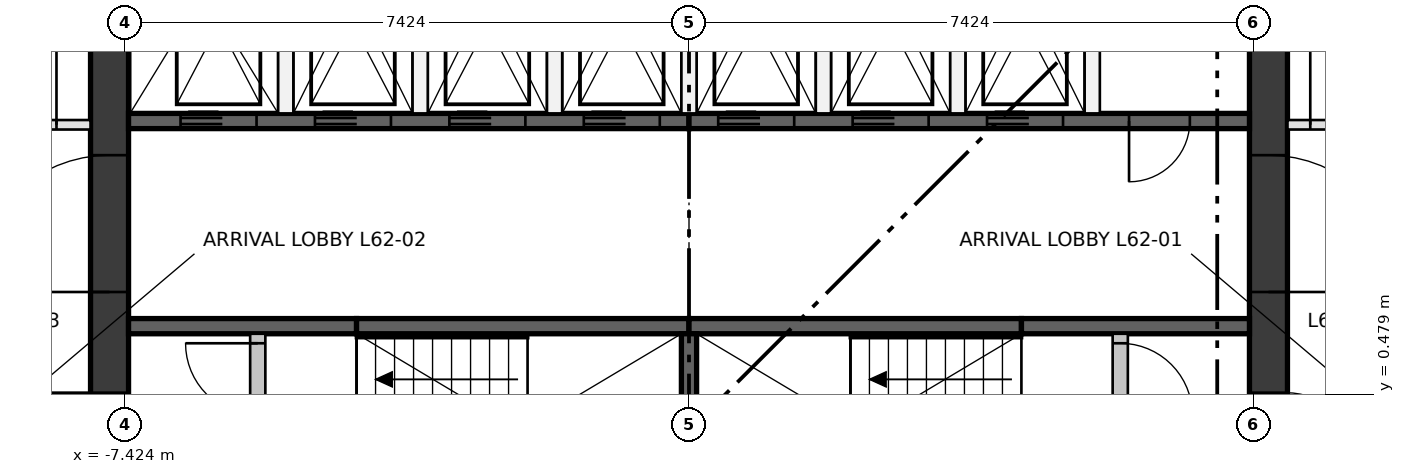
"""IFC4 building model, lengths in metres.
Left out: names, types, materials, properties, quantities, classifications, styles, units other than length and angle.
Written with IfcOpenShell. Run it as: python <this file> out.ifc"""

import sys

from ifc_helpers import new_model, si_unit, direction, frame, frame_2d, origin, place, context, subcontext, project, spatial, rectangle, extrude, element, fill, save


model = new_model("IFC4")
c1 = context("Model", 3, precision=1e-05, world=origin(), true_north=direction((0.0, 1.0)))
c2 = subcontext(c1, "Body", "Model", "MODEL_VIEW")
j1 = project(units=[si_unit("LENGTHUNIT", "METRE"), si_unit("PLANEANGLEUNIT", "RADIAN")], contexts=[c1])
p1 = place(None, origin())
s1 = spatial("IfcSite", under=j1, at=p1, CompositionType="ELEMENT")
p2 = place(p1, origin())
s2 = spatial("IfcBuilding", under=s1, at=p2, CompositionType="ELEMENT")
p3 = place(p2, frame((0.0, 0.0, 227.85)))
s3 = spatial("IfcBuildingStorey", under=s2, at=p3, CompositionType="ELEMENT", Elevation=227.85)
p4 = place(p3, frame((-7.624, -7.374, 0.0), z_axis=(0.0, 0.0, 1.0), x_axis=(0.0, 1.0, 0.0)))
e1 = element("IfcWall", 1, at=p4, inside=s3, PredefinedType="SHEAR", context=c2, shape_type="SweptSolid", body=[
    extrude(rectangle(XDim=14.748, YDim=0.5, at=frame_2d((7.374, 0.0))), origin(), (0.0, 0.0, 1.0), 3.35),
])
p5 = place(p4, frame((6.874, 0.0, 0.0)))
e2 = element("IfcOpeningElement", 2, at=p5, cuts=e1, PredefinedType="OPENING", context=c2, shape_type="SweptSolid", body=[
    extrude(rectangle(XDim=1.0, YDim=2.1, at=frame_2d((0.5, 1.05))), frame((0.0, 0.26, 0.0), z_axis=(0.0, -1.0, 0.0), x_axis=(1.0, 0.0, 0.0)), (0.0, 0.0, 1.0), 0.52),
])
p6 = place(p4, frame((3.75, 0.0, 0.0)))
e3 = element("IfcOpeningElement", 3, at=p6, cuts=e1, PredefinedType="OPENING", context=c2, shape_type="SweptSolid", body=[
    extrude(rectangle(XDim=1.8, YDim=2.1, at=frame_2d((0.9, 1.05))), frame((0.0, 0.26, 0.0), z_axis=(0.0, -1.0, 0.0), x_axis=(1.0, 0.0, 0.0)), (0.0, 0.0, 1.0), 0.52),
])
p7 = place(p4, frame((9.198, 0.0, 0.0)))
e4 = element("IfcOpeningElement", 4, at=p7, cuts=e1, PredefinedType="OPENING", context=c2, shape_type="SweptSolid", body=[
    extrude(rectangle(XDim=1.8, YDim=2.1, at=frame_2d((0.9, 1.05))), frame((0.0, 0.26, 0.0), z_axis=(0.0, -1.0, 0.0), x_axis=(1.0, 0.0, 0.0)), (0.0, 0.0, 1.0), 0.52),
])
p8 = place(p3, frame((7.624, -7.374, 0.0), z_axis=(0.0, 0.0, 1.0), x_axis=(0.0, 1.0, 0.0)))
e5 = element("IfcWall", 5, at=p8, inside=s3, PredefinedType="SHEAR", context=c2, shape_type="SweptSolid", body=[
    extrude(rectangle(XDim=14.748, YDim=0.5, at=frame_2d((7.374, 0.0))), origin(), (0.0, 0.0, 1.0), 3.35),
])
p9 = place(p8, frame((6.874, 0.0, 0.0)))
e6 = element("IfcOpeningElement", 6, at=p9, cuts=e5, PredefinedType="OPENING", context=c2, shape_type="SweptSolid", body=[
    extrude(rectangle(XDim=1.0, YDim=2.1, at=frame_2d((0.5, 1.05))), frame((0.0, 0.26, 0.0), z_axis=(0.0, -1.0, 0.0), x_axis=(1.0, 0.0, 0.0)), (0.0, 0.0, 1.0), 0.52),
])
p10 = place(p8, frame((3.75, 0.0, 0.0)))
e7 = element("IfcOpeningElement", 7, at=p10, cuts=e5, PredefinedType="OPENING", context=c2, shape_type="SweptSolid", body=[
    extrude(rectangle(XDim=1.8, YDim=2.1, at=frame_2d((0.9, 1.05))), frame((0.0, 0.26, 0.0), z_axis=(0.0, -1.0, 0.0), x_axis=(1.0, 0.0, 0.0)), (0.0, 0.0, 1.0), 0.52),
])
p11 = place(p8, frame((9.198, 0.0, 0.0)))
e8 = element("IfcOpeningElement", 8, at=p11, cuts=e5, PredefinedType="OPENING", context=c2, shape_type="SweptSolid", body=[
    extrude(rectangle(XDim=1.8, YDim=2.1, at=frame_2d((0.9, 1.05))), frame((0.0, 0.26, 0.0), z_axis=(0.0, -1.0, 0.0), x_axis=(1.0, 0.0, 0.0)), (0.0, 0.0, 1.0), 0.52),
])
p12 = place(p3, frame((-7.374, 4.074, 0.0), z_axis=(0.0, 0.0, 1.0), x_axis=(1.0, 0.0, 0.0)))
e9 = element("IfcWall", 9, at=p12, inside=s3, PredefinedType="SHEAR", context=c2, shape_type="SweptSolid", body=[
    extrude(rectangle(XDim=7.374, YDim=0.2, at=frame_2d((3.687, 0.0))), origin(), (0.0, 0.0, 1.0), 3.0),
])
p13 = place(p12, frame((0.684, 0.0, 0.0)))
e10 = element("IfcOpeningElement", 10, at=p13, cuts=e9, PredefinedType="OPENING", context=c2, shape_type="SweptSolid", body=[
    extrude(rectangle(XDim=1.0, YDim=2.1, at=frame_2d((0.5, 1.05))), frame((0.0, 0.11, 0.0), z_axis=(0.0, -1.0, 0.0), x_axis=(1.0, 0.0, 0.0)), (0.0, 0.0, 1.0), 0.22),
])
p14 = place(p12, frame((2.453, 0.0, 0.0)))
e11 = element("IfcOpeningElement", 11, at=p14, cuts=e9, PredefinedType="OPENING", context=c2, shape_type="SweptSolid", body=[
    extrude(rectangle(XDim=1.0, YDim=2.1, at=frame_2d((0.5, 1.05))), frame((0.0, 0.11, 0.0), z_axis=(0.0, -1.0, 0.0), x_axis=(1.0, 0.0, 0.0)), (0.0, 0.0, 1.0), 0.22),
])
p15 = place(p12, frame((4.221, 0.0, 0.0)))
e12 = element("IfcOpeningElement", 12, at=p15, cuts=e9, PredefinedType="OPENING", context=c2, shape_type="SweptSolid", body=[
    extrude(rectangle(XDim=1.0, YDim=2.1, at=frame_2d((0.5, 1.05))), frame((0.0, 0.11, 0.0), z_axis=(0.0, -1.0, 0.0), x_axis=(1.0, 0.0, 0.0)), (0.0, 0.0, 1.0), 0.22),
])
p16 = place(p12, frame((5.99, 0.0, 0.0)))
e13 = element("IfcOpeningElement", 13, at=p16, cuts=e9, PredefinedType="OPENING", context=c2, shape_type="SweptSolid", body=[
    extrude(rectangle(XDim=1.0, YDim=2.1, at=frame_2d((0.5, 1.05))), frame((0.0, 0.11, 0.0), z_axis=(0.0, -1.0, 0.0), x_axis=(1.0, 0.0, 0.0)), (0.0, 0.0, 1.0), 0.22),
])
p17 = place(p3, frame((0.0, 4.074, 0.0), z_axis=(0.0, 0.0, 1.0), x_axis=(1.0, 0.0, 0.0)))
e14 = element("IfcWall", 14, at=p17, inside=s3, PredefinedType="SHEAR", context=c2, shape_type="SweptSolid", body=[
    extrude(rectangle(XDim=7.374, YDim=0.2, at=frame_2d((3.687, 0.0))), origin(), (0.0, 0.0, 1.0), 3.0),
])
p18 = place(p17, frame((0.384, 0.0, 0.0)))
e15 = element("IfcOpeningElement", 15, at=p18, cuts=e14, PredefinedType="OPENING", context=c2, shape_type="SweptSolid", body=[
    extrude(rectangle(XDim=1.0, YDim=2.1, at=frame_2d((0.5, 1.05))), frame((0.0, 0.11, 0.0), z_axis=(0.0, -1.0, 0.0), x_axis=(1.0, 0.0, 0.0)), (0.0, 0.0, 1.0), 0.22),
])
p19 = place(p17, frame((2.153, 0.0, 0.0)))
e16 = element("IfcOpeningElement", 16, at=p19, cuts=e14, PredefinedType="OPENING", context=c2, shape_type="SweptSolid", body=[
    extrude(rectangle(XDim=1.0, YDim=2.1, at=frame_2d((0.5, 1.05))), frame((0.0, 0.11, 0.0), z_axis=(0.0, -1.0, 0.0), x_axis=(1.0, 0.0, 0.0)), (0.0, 0.0, 1.0), 0.22),
])
p20 = place(p17, frame((3.921, 0.0, 0.0)))
e17 = element("IfcOpeningElement", 17, at=p20, cuts=e14, PredefinedType="OPENING", context=c2, shape_type="SweptSolid", body=[
    extrude(rectangle(XDim=1.0, YDim=2.1, at=frame_2d((0.5, 1.05))), frame((0.0, 0.11, 0.0), z_axis=(0.0, -1.0, 0.0), x_axis=(1.0, 0.0, 0.0)), (0.0, 0.0, 1.0), 0.22),
])
p21 = place(p17, frame((5.79, 0.0, 0.0)))
e18 = element("IfcOpeningElement", 18, at=p21, cuts=e14, PredefinedType="OPENING", context=c2, shape_type="SweptSolid", body=[
    extrude(rectangle(XDim=0.8, YDim=2.1, at=frame_2d((0.4, 1.05))), frame((0.0, 0.11, 0.0), z_axis=(0.0, -1.0, 0.0), x_axis=(1.0, 0.0, 0.0)), (0.0, 0.0, 1.0), 0.22),
])
p22 = place(p3, frame((-7.374, 1.375, 0.0), z_axis=(0.0, 0.0, 1.0), x_axis=(1.0, 0.0, 0.0)))
e19 = element("IfcWall", 19, at=p22, inside=s3, PredefinedType="SHEAR", context=c2, shape_type="SweptSolid", body=[
    extrude(rectangle(XDim=3.0, YDim=0.2, at=frame_2d((1.5, 0.0))), origin(), (0.0, 0.0, 1.0), 3.0),
])
for number, where, z_axis, x_axis in (
    (20, (-4.374, 1.375, 0.0), (0.0, 0.0, 1.0), (1.0, 0.0, 0.0)),
    (21, (0.0, 1.375, 0.0), (0.0, 0.0, 1.0), (1.0, 0.0, 0.0)),
):
    element("IfcWall", number, at=place(p3, frame(where, z_axis=z_axis, x_axis=x_axis)), inside=s3, PredefinedType="SHEAR", context=c2, shape_type="SweptSolid", body=[
        extrude(rectangle(XDim=4.374, YDim=0.2, at=frame_2d((2.187, 0.0))), origin(), (0.0, 0.0, 1.0), 3.0),
    ])
p23 = place(p3, frame((4.374, 1.375, 0.0), z_axis=(0.0, 0.0, 1.0), x_axis=(1.0, 0.0, 0.0)))
e22 = element("IfcWall", 22, at=p23, inside=s3, PredefinedType="SHEAR", context=c2, shape_type="SweptSolid", body=[
    extrude(rectangle(XDim=3.0, YDim=0.2, at=frame_2d((1.5, 0.0))), origin(), (0.0, 0.0, 1.0), 3.0),
])
p24 = place(p3, frame((0.0, -1.275, 0.0), z_axis=(0.0, 0.0, 1.0), x_axis=(0.0, 1.0, 0.0)))
e23 = element("IfcWall", 23, at=p24, inside=s3, PredefinedType="SHEAR", context=c2, shape_type="SweptSolid", body=[
    extrude(rectangle(XDim=2.55, YDim=0.2, at=frame_2d((1.275, 0.0))), origin(), (0.0, 0.0, 1.0), 3.0),
])
for number, where, z_axis, x_axis in (
    (24, (-5.305, 4.174, 0.0), (0.0, 0.0, 1.0), (0.0, 1.0, 0.0)),
    (25, (-3.537, 4.174, 0.0), (0.0, 0.0, 1.0), (0.0, 1.0, 0.0)),
    (26, (-1.769, 4.174, 0.0), (0.0, 0.0, 1.0), (0.0, 1.0, 0.0)),
    (27, (0.0, 4.174, 0.0), (0.0, 0.0, 1.0), (0.0, 1.0, 0.0)),
    (28, (1.769, 4.174, 0.0), (0.0, 0.0, 1.0), (0.0, 1.0, 0.0)),
    (29, (3.537, 4.174, 0.0), (0.0, 0.0, 1.0), (0.0, 1.0, 0.0)),
    (30, (5.305, 4.174, 0.0), (0.0, 0.0, 1.0), (0.0, 1.0, 0.0)),
):
    element("IfcWall", number, at=place(p3, frame(where, z_axis=z_axis, x_axis=x_axis)), inside=s3, PredefinedType="PARTITIONING", context=c2, shape_type="SweptSolid", body=[
        extrude(rectangle(XDim=3.2, YDim=0.2, at=frame_2d((1.6, 0.0))), origin(), (0.0, 0.0, 1.0), 3.0),
    ])
p25 = place(p3, frame((-5.674, -1.275, 0.0), z_axis=(0.0, 0.0, 1.0), x_axis=(0.0, 1.0, 0.0)))
e31 = element("IfcWall", 31, at=p25, inside=s3, PredefinedType="PARTITIONING", context=c2, shape_type="SweptSolid", body=[
    extrude(rectangle(XDim=2.55, YDim=0.2, at=frame_2d((1.275, 0.0))), origin(), (0.0, 0.0, 1.0), 3.0),
])
p26 = place(p25, frame((0.125, 0.0, 0.0)))
e32 = element("IfcOpeningElement", 32, at=p26, cuts=e31, PredefinedType="OPENING", context=c2, shape_type="SweptSolid", body=[
    extrude(rectangle(XDim=0.95, YDim=2.1, at=frame_2d((0.475, 1.05))), frame((0.0, 0.11, 0.0), z_axis=(0.0, -1.0, 0.0), x_axis=(1.0, 0.0, 0.0)), (0.0, 0.0, 1.0), 0.22),
])
p27 = place(p25, frame((1.475, 0.0, 0.0)))
e33 = element("IfcOpeningElement", 33, at=p27, cuts=e31, PredefinedType="OPENING", context=c2, shape_type="SweptSolid", body=[
    extrude(rectangle(XDim=0.95, YDim=2.1, at=frame_2d((0.475, 1.05))), frame((0.0, 0.11, 0.0), z_axis=(0.0, -1.0, 0.0), x_axis=(1.0, 0.0, 0.0)), (0.0, 0.0, 1.0), 0.22),
])
p28 = place(p3, frame((5.674, -1.275, 0.0), z_axis=(0.0, 0.0, 1.0), x_axis=(0.0, 1.0, 0.0)))
e34 = element("IfcWall", 34, at=p28, inside=s3, PredefinedType="PARTITIONING", context=c2, shape_type="SweptSolid", body=[
    extrude(rectangle(XDim=2.55, YDim=0.2, at=frame_2d((1.275, 0.0))), origin(), (0.0, 0.0, 1.0), 3.0),
])
p29 = place(p28, frame((0.125, 0.0, 0.0)))
e35 = element("IfcOpeningElement", 35, at=p29, cuts=e34, PredefinedType="OPENING", context=c2, shape_type="SweptSolid", body=[
    extrude(rectangle(XDim=0.95, YDim=2.1, at=frame_2d((0.475, 1.05))), frame((0.0, 0.11, 0.0), z_axis=(0.0, -1.0, 0.0), x_axis=(1.0, 0.0, 0.0)), (0.0, 0.0, 1.0), 0.22),
])
p30 = place(p28, frame((1.475, 0.0, 0.0)))
e36 = element("IfcOpeningElement", 36, at=p30, cuts=e34, PredefinedType="OPENING", context=c2, shape_type="SweptSolid", body=[
    extrude(rectangle(XDim=0.95, YDim=2.1, at=frame_2d((0.475, 1.05))), frame((0.0, 0.11, 0.0), z_axis=(0.0, -1.0, 0.0), x_axis=(1.0, 0.0, 0.0)), (0.0, 0.0, 1.0), 0.22),
])
p31 = place(p3, frame((7.874, 4.024, 0.0), z_axis=(0.0, 0.0, 1.0), x_axis=(1.0, 0.0, 0.0)))
e37 = element("IfcWall", 37, at=p31, inside=s3, PredefinedType="PARTITIONING", context=c2, shape_type="SweptSolid", body=[
    extrude(rectangle(XDim=2.159, YDim=0.125, at=frame_2d((1.08, 0.0))), origin(), (0.0, 0.0, 1.0), 3.0),
])
p32 = place(p31, frame((0.3, 0.0, 0.0)))
e38 = element("IfcOpeningElement", 38, at=p32, cuts=e37, PredefinedType="OPENING", context=c2, shape_type="SweptSolid", body=[
    extrude(rectangle(XDim=1.0, YDim=2.1, at=frame_2d((0.5, 1.05))), frame((0.0, 0.073, 0.0), z_axis=(0.0, -1.0, 0.0), x_axis=(1.0, 0.0, 0.0)), (0.0, 0.0, 1.0), 0.145),
])
p33 = place(p3, frame((-9.822, 4.024, 0.0), z_axis=(0.0, 0.0, 1.0), x_axis=(1.0, 0.0, 0.0)))
e39 = element("IfcWall", 39, at=p33, inside=s3, PredefinedType="PARTITIONING", context=c2, shape_type="SweptSolid", body=[
    extrude(rectangle(XDim=1.948, YDim=0.125, at=frame_2d((0.974, 0.0))), origin(), (0.0, 0.0, 1.0), 3.0),
])
p34 = place(p33, frame((0.5, 0.0, 0.0)))
e40 = element("IfcOpeningElement", 40, at=p34, cuts=e39, PredefinedType="OPENING", context=c2, shape_type="SweptSolid", body=[
    extrude(rectangle(XDim=1.0, YDim=2.1, at=frame_2d((0.5, 1.05))), frame((0.0, 0.073, 0.0), z_axis=(0.0, -1.0, 0.0), x_axis=(1.0, 0.0, 0.0)), (0.0, 0.0, 1.0), 0.145),
])
p35 = place(p13, frame((1.0, 0.0, 0.0), z_axis=(0.0, 0.0, 1.0), x_axis=(-1.0, 0.0, 0.0)))
e41 = element("IfcDoor", 41, at=p35, inside=s3, OperationType="DOUBLE_DOOR_SLIDING", PredefinedType="DOOR", context=c2, shape_type="SweptSolid", body=[
    extrude(rectangle(XDim=1.0, YDim=2.1, at=frame_2d((0.5, 1.05))), frame((0.0, 0.025, 0.0), z_axis=(0.0, -1.0, 0.0), x_axis=(1.0, 0.0, 0.0)), (0.0, 0.0, 1.0), 0.05),
])
fill(e10, e41)
p36 = place(p14, frame((1.0, 0.0, 0.0), z_axis=(0.0, 0.0, 1.0), x_axis=(-1.0, 0.0, 0.0)))
e42 = element("IfcDoor", 42, at=p36, inside=s3, OperationType="DOUBLE_DOOR_SLIDING", PredefinedType="DOOR", context=c2, shape_type="SweptSolid", body=[
    extrude(rectangle(XDim=1.0, YDim=2.1, at=frame_2d((0.5, 1.05))), frame((0.0, 0.025, 0.0), z_axis=(0.0, -1.0, 0.0), x_axis=(1.0, 0.0, 0.0)), (0.0, 0.0, 1.0), 0.05),
])
fill(e11, e42)
p37 = place(p15, frame((1.0, 0.0, 0.0), z_axis=(0.0, 0.0, 1.0), x_axis=(-1.0, 0.0, 0.0)))
e43 = element("IfcDoor", 43, at=p37, inside=s3, OperationType="DOUBLE_DOOR_SLIDING", PredefinedType="DOOR", context=c2, shape_type="SweptSolid", body=[
    extrude(rectangle(XDim=1.0, YDim=2.1, at=frame_2d((0.5, 1.05))), frame((0.0, 0.025, 0.0), z_axis=(0.0, -1.0, 0.0), x_axis=(1.0, 0.0, 0.0)), (0.0, 0.0, 1.0), 0.05),
])
fill(e12, e43)
p38 = place(p16, frame((1.0, 0.0, 0.0), z_axis=(0.0, 0.0, 1.0), x_axis=(-1.0, 0.0, 0.0)))
e44 = element("IfcDoor", 44, at=p38, inside=s3, OperationType="DOUBLE_DOOR_SLIDING", PredefinedType="DOOR", context=c2, shape_type="SweptSolid", body=[
    extrude(rectangle(XDim=1.0, YDim=2.1, at=frame_2d((0.5, 1.05))), frame((0.0, 0.025, 0.0), z_axis=(0.0, -1.0, 0.0), x_axis=(1.0, 0.0, 0.0)), (0.0, 0.0, 1.0), 0.05),
])
fill(e13, e44)
p39 = place(p18, frame((1.0, 0.0, 0.0), z_axis=(0.0, 0.0, 1.0), x_axis=(-1.0, 0.0, 0.0)))
e45 = element("IfcDoor", 45, at=p39, inside=s3, OperationType="DOUBLE_DOOR_SLIDING", PredefinedType="DOOR", context=c2, shape_type="SweptSolid", body=[
    extrude(rectangle(XDim=1.0, YDim=2.1, at=frame_2d((0.5, 1.05))), frame((0.0, 0.025, 0.0), z_axis=(0.0, -1.0, 0.0), x_axis=(1.0, 0.0, 0.0)), (0.0, 0.0, 1.0), 0.05),
])
fill(e15, e45)
p40 = place(p19, frame((1.0, 0.0, 0.0), z_axis=(0.0, 0.0, 1.0), x_axis=(-1.0, 0.0, 0.0)))
e46 = element("IfcDoor", 46, at=p40, inside=s3, OperationType="DOUBLE_DOOR_SLIDING", PredefinedType="DOOR", context=c2, shape_type="SweptSolid", body=[
    extrude(rectangle(XDim=1.0, YDim=2.1, at=frame_2d((0.5, 1.05))), frame((0.0, 0.025, 0.0), z_axis=(0.0, -1.0, 0.0), x_axis=(1.0, 0.0, 0.0)), (0.0, 0.0, 1.0), 0.05),
])
fill(e16, e46)
p41 = place(p20, frame((1.0, 0.0, 0.0), z_axis=(0.0, 0.0, 1.0), x_axis=(-1.0, 0.0, 0.0)))
e47 = element("IfcDoor", 47, at=p41, inside=s3, OperationType="DOUBLE_DOOR_SLIDING", PredefinedType="DOOR", context=c2, shape_type="SweptSolid", body=[
    extrude(rectangle(XDim=1.0, YDim=2.1, at=frame_2d((0.5, 1.05))), frame((0.0, 0.025, 0.0), z_axis=(0.0, -1.0, 0.0), x_axis=(1.0, 0.0, 0.0)), (0.0, 0.0, 1.0), 0.05),
])
fill(e17, e47)
p42 = place(p27, origin())
e48 = element("IfcDoor", 48, at=p42, inside=s3, OperationType="SINGLE_SWING_RIGHT", PredefinedType="DOOR", context=c2, shape_type="SweptSolid", body=[
    extrude(rectangle(XDim=0.95, YDim=2.1, at=frame_2d((0.475, 1.05))), frame((0.0, 0.025, 0.0), z_axis=(0.0, -1.0, 0.0), x_axis=(1.0, 0.0, 0.0)), (0.0, 0.0, 1.0), 0.05),
])
fill(e33, e48)
p43 = place(p30, frame((0.95, 0.0, 0.0), z_axis=(0.0, 0.0, 1.0), x_axis=(-1.0, 0.0, 0.0)))
e49 = element("IfcDoor", 49, at=p43, inside=s3, OperationType="SINGLE_SWING_LEFT", PredefinedType="DOOR", context=c2, shape_type="SweptSolid", body=[
    extrude(rectangle(XDim=0.95, YDim=2.1, at=frame_2d((0.475, 1.05))), frame((0.0, 0.025, 0.0), z_axis=(0.0, -1.0, 0.0), x_axis=(1.0, 0.0, 0.0)), (0.0, 0.0, 1.0), 0.05),
])
fill(e36, e49)
p44 = place(p21, frame((0.8, 0.0, 0.0), z_axis=(0.0, 0.0, 1.0), x_axis=(-1.0, 0.0, 0.0)))
e50 = element("IfcDoor", 50, at=p44, inside=s3, OperationType="SINGLE_SWING_LEFT", PredefinedType="DOOR", context=c2, shape_type="SweptSolid", body=[
    extrude(rectangle(XDim=0.8, YDim=2.1, at=frame_2d((0.4, 1.05))), frame((0.0, 0.025, 0.0), z_axis=(0.0, -1.0, 0.0), x_axis=(1.0, 0.0, 0.0)), (0.0, 0.0, 1.0), 0.05),
])
fill(e18, e50)
p45 = place(p5, origin())
e51 = element("IfcDoor", 51, at=p45, inside=s3, OperationType="SINGLE_SWING_RIGHT", PredefinedType="DOOR", context=c2, shape_type="SweptSolid", body=[
    extrude(rectangle(XDim=1.0, YDim=2.1, at=frame_2d((0.5, 1.05))), frame((0.0, 0.25, 0.0), z_axis=(0.0, -1.0, 0.0), x_axis=(1.0, 0.0, 0.0)), (0.0, 0.0, 1.0), 0.05),
])
fill(e2, e51)
p46 = place(p7, origin())
e52 = element("IfcDoor", 52, at=p46, inside=s3, OperationType="DOUBLE_DOOR_SINGLE_SWING", PredefinedType="DOOR", context=c2, shape_type="SweptSolid", body=[
    extrude(rectangle(XDim=1.8, YDim=2.1, at=frame_2d((0.9, 1.05))), frame((0.0, 0.025, 0.0), z_axis=(0.0, -1.0, 0.0), x_axis=(1.0, 0.0, 0.0)), (0.0, 0.0, 1.0), 0.05),
])
fill(e4, e52)
p47 = place(p9, frame((1.0, 0.0, 0.0), z_axis=(0.0, 0.0, 1.0), x_axis=(-1.0, 0.0, 0.0)))
e53 = element("IfcDoor", 53, at=p47, inside=s3, OperationType="SINGLE_SWING_LEFT", PredefinedType="DOOR", context=c2, shape_type="SweptSolid", body=[
    extrude(rectangle(XDim=1.0, YDim=2.1, at=frame_2d((0.5, 1.05))), frame((0.0, 0.25, 0.0), z_axis=(0.0, -1.0, 0.0), x_axis=(1.0, 0.0, 0.0)), (0.0, 0.0, 1.0), 0.05),
])
fill(e6, e53)
p48 = place(p11, frame((1.8, 0.0, 0.0), z_axis=(0.0, 0.0, 1.0), x_axis=(-1.0, 0.0, 0.0)))
e54 = element("IfcDoor", 54, at=p48, inside=s3, OperationType="DOUBLE_DOOR_SINGLE_SWING", PredefinedType="DOOR", context=c2, shape_type="SweptSolid", body=[
    extrude(rectangle(XDim=1.8, YDim=2.1, at=frame_2d((0.9, 1.05))), frame((0.0, 0.025, 0.0), z_axis=(0.0, -1.0, 0.0), x_axis=(1.0, 0.0, 0.0)), (0.0, 0.0, 1.0), 0.05),
])
fill(e8, e54)
p49 = place(p32, origin())
e55 = element("IfcDoor", 55, at=p49, inside=s3, OperationType="SINGLE_SWING_LEFT", PredefinedType="DOOR", context=c2, shape_type="SweptSolid", body=[
    extrude(rectangle(XDim=1.0, YDim=2.1, at=frame_2d((0.5, 1.05))), frame((0.0, 0.025, 0.0), z_axis=(0.0, -1.0, 0.0), x_axis=(1.0, 0.0, 0.0)), (0.0, 0.0, 1.0), 0.05),
])
fill(e38, e55)
p50 = place(p34, origin())
e56 = element("IfcDoor", 56, at=p50, inside=s3, OperationType="SINGLE_SWING_RIGHT", PredefinedType="DOOR", context=c2, shape_type="SweptSolid", body=[
    extrude(rectangle(XDim=1.0, YDim=2.1, at=frame_2d((0.5, 1.05))), frame((0.0, 0.025, 0.0), z_axis=(0.0, -1.0, 0.0), x_axis=(1.0, 0.0, 0.0)), (0.0, 0.0, 1.0), 0.05),
])
fill(e40, e56)
save(model, sys.argv[1])
